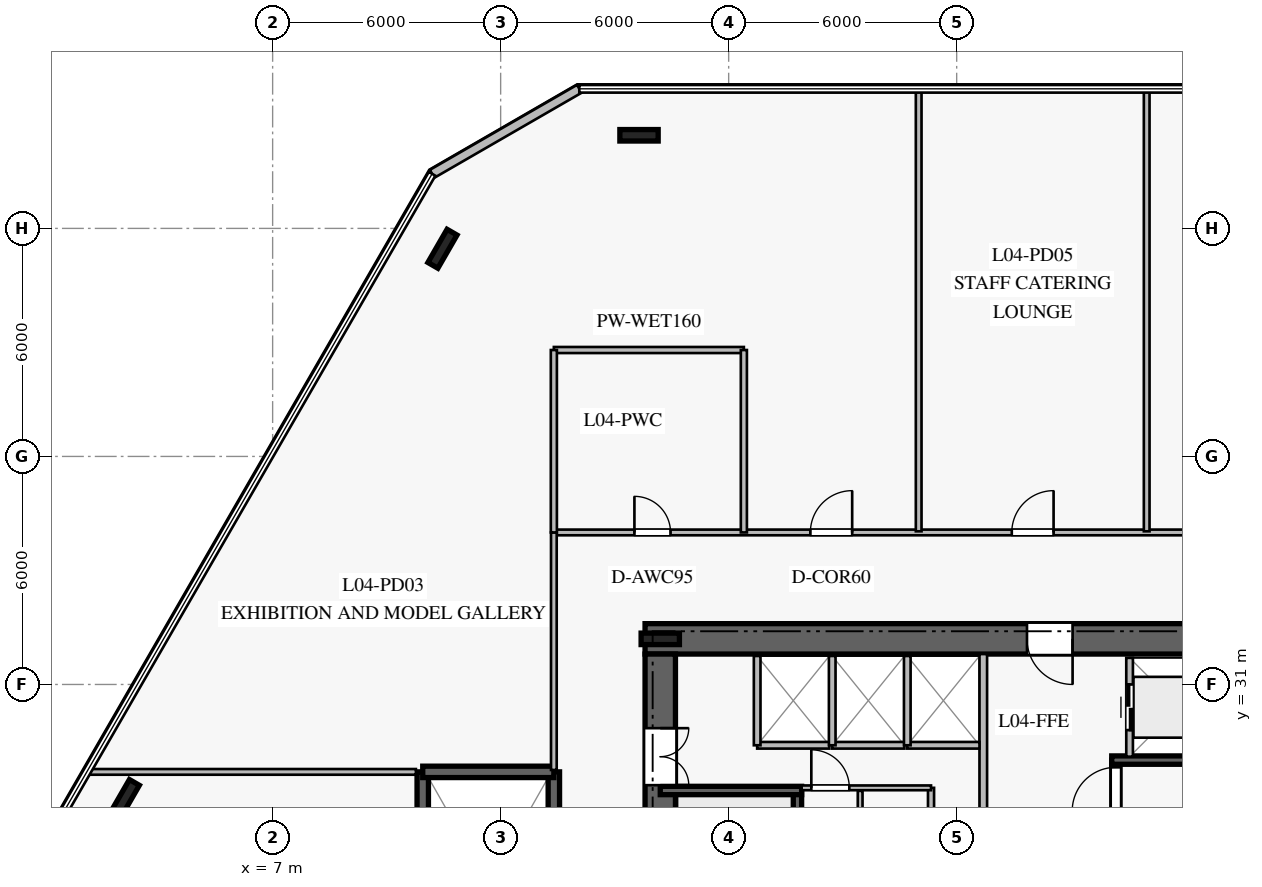
"""IFC4 building model, lengths in metres.
Left out: names, types, materials, properties, quantities, classifications, styles, units other than length and angle.
Written with IfcOpenShell. Run it as: python <this file> out.ifc"""

import sys

from ifc_helpers import new_model, si_unit, direction, frame, frame_2d, origin, origin_2d, place, context, subcontext, project, spatial, rectangle, i_section, extrude, element, fill, save


model = new_model("IFC4")
c1 = context("Model", 3, precision=1e-05, world=origin(), true_north=direction((0.0, 1.0)))
c2 = subcontext(c1, "Body", "Model", "MODEL_VIEW")
j1 = project(units=[si_unit("LENGTHUNIT", "METRE"), si_unit("PLANEANGLEUNIT", "RADIAN")], contexts=[c1])
p1 = place(None, origin())
s1 = spatial("IfcSite", under=j1, at=p1, CompositionType="ELEMENT")
p2 = place(p1, origin())
s2 = spatial("IfcBuilding", under=s1, at=p2, CompositionType="ELEMENT")
p3 = place(p2, frame((0.0, 0.0, 19.0)))
s3 = spatial("IfcBuildingStorey", under=s2, at=p3, CompositionType="ELEMENT", Elevation=19.0)
p4 = place(p3, frame((33.2, 32.2, 0.0), z_axis=(0.0, 0.0, 1.0), x_axis=(-1.0, 0.0, 0.0)))
e1 = element("IfcWall", 1, at=p4, inside=s3, PredefinedType="SHEAR", context=c2, shape_type="SweptSolid", body=[
    extrude(rectangle(XDim=16.4, YDim=0.8, at=frame_2d((8.2, 0.0))), origin(), (0.0, 0.0, 1.0), 4.76),
])
p5 = place(p4, frame((5.15, 0.0, 0.0)))
e2 = element("IfcOpeningElement", 2, at=p5, cuts=e1, PredefinedType="OPENING", context=c2, shape_type="SweptSolid", body=[
    extrude(rectangle(XDim=1.2, YDim=2.25, at=frame_2d((0.6, 1.125))), frame((0.0, 0.41, 0.0), z_axis=(0.0, -1.0, 0.0), x_axis=(1.0, 0.0, 0.0)), (0.0, 0.0, 1.0), 0.82),
])
p6 = place(p3, frame((17.2, 31.8, 0.0), z_axis=(0.0, 0.0, 1.0), x_axis=(0.0, -1.0, 0.0)))
e3 = element("IfcWall", 3, at=p6, inside=s3, PredefinedType="SHEAR", context=c2, shape_type="SweptSolid", body=[
    extrude(rectangle(XDim=13.6, YDim=0.8, at=frame_2d((6.8, 0.0))), origin(), (0.0, 0.0, 1.0), 4.76),
])
p7 = place(p6, frame((1.95, 0.0, 0.0)))
e4 = element("IfcOpeningElement", 4, at=p7, cuts=e3, PredefinedType="OPENING", context=c2, shape_type="SweptSolid", body=[
    extrude(rectangle(XDim=1.5, YDim=2.2, at=frame_2d((0.75, 1.1))), frame((0.0, 0.41, 0.0), z_axis=(0.0, -1.0, 0.0), x_axis=(1.0, 0.0, 0.0)), (0.0, 0.0, 1.0), 0.82),
])
p8 = place(p3, frame((17.2, 32.2, 0.0), z_axis=(0.0, 0.0, 1.0), x_axis=(1.0, 0.0, 0.0)))
e5 = element("IfcColumn", 5, at=p8, inside=s3, PredefinedType="COLUMN", context=c2, shape_type="SweptSolid", body=[
    extrude(i_section(OverallWidth=0.302, OverallDepth=1.008, WebThickness=0.021, FlangeThickness=0.04, at=origin_2d()), origin(), (0.0, 0.0, 1.0), 5.0),
])
p9 = place(p3, frame((20.81, 20.99, 0.0), z_axis=(0.0, 0.0, 1.0), x_axis=(0.0, 1.0, 0.0)))
e6 = element("IfcWall", 6, at=p9, inside=s3, PredefinedType="SOLIDWALL", context=c2, shape_type="SweptSolid", body=[
    extrude(rectangle(XDim=7.22, YDim=0.22, at=frame_2d((3.61, 0.0))), origin(), (0.0, 0.0, 1.0), 4.76),
])
p10 = place(p9, frame((0.18, 0.0, 0.0)))
e7 = element("IfcOpeningElement", 7, at=p10, cuts=e6, PredefinedType="OPENING", context=c2, shape_type="SweptSolid", body=[
    extrude(rectangle(XDim=1.15, YDim=2.2, at=frame_2d((0.575, 1.1))), frame((0.0, 0.12, 0.0), z_axis=(0.0, -1.0, 0.0), x_axis=(1.0, 0.0, 0.0)), (0.0, 0.0, 1.0), 0.24),
])
p11 = place(p3, frame((17.2, 28.21, 0.0), z_axis=(0.0, 0.0, 1.0), x_axis=(1.0, 0.0, 0.0)))
e8 = element("IfcWall", 8, at=p11, inside=s3, PredefinedType="SOLIDWALL", context=c2, shape_type="SweptSolid", body=[
    extrude(rectangle(XDim=3.72, YDim=0.22, at=frame_2d((1.86, 0.0))), origin(), (0.0, 0.0, 1.0), 4.76),
])
p12 = place(p3, frame((29.19, 21.79, 0.0), z_axis=(0.0, 0.0, 1.0), x_axis=(0.0, 1.0, 0.0)))
e9 = element("IfcWall", 9, at=p12, inside=s3, PredefinedType="SOLIDWALL", context=c2, shape_type="SweptSolid", body=[
    extrude(rectangle(XDim=7.22, YDim=0.22, at=frame_2d((3.61, 0.0))), origin(), (0.0, 0.0, 1.0), 4.76),
])
p13 = place(p12, frame((5.88, 0.0, 0.0)))
e10 = element("IfcOpeningElement", 10, at=p13, cuts=e9, PredefinedType="OPENING", context=c2, shape_type="SweptSolid", body=[
    extrude(rectangle(XDim=1.15, YDim=2.2, at=frame_2d((0.575, 1.1))), frame((0.0, 0.12, 0.0), z_axis=(0.0, -1.0, 0.0), x_axis=(1.0, 0.0, 0.0)), (0.0, 0.0, 1.0), 0.24),
])
p14 = place(p3, frame((29.08, 29.01, 0.0), z_axis=(0.0, 0.0, 1.0), x_axis=(1.0, 0.0, 0.0)))
e11 = element("IfcWall", 11, at=p14, inside=s3, PredefinedType="SOLIDWALL", context=c2, shape_type="SweptSolid", body=[
    extrude(rectangle(XDim=3.72, YDim=0.22, at=frame_2d((1.86, 0.0))), origin(), (0.0, 0.0, 1.0), 4.76),
])
p15 = place(p3, frame((14.4, 21.3, 0.0), z_axis=(0.0, 0.0, 1.0), x_axis=(0.0, 1.0, 0.0)))
e12 = element("IfcWall", 12, at=p15, inside=s3, PredefinedType="SOLIDWALL", context=c2, shape_type="SweptSolid", body=[
    extrude(rectangle(XDim=7.4, YDim=0.3, at=frame_2d((3.7, 0.0))), origin(), (0.0, 0.0, 1.0), 4.76),
])
p16 = place(p15, frame((0.22, 0.0, 0.0)))
e13 = element("IfcOpeningElement", 13, at=p16, cuts=e12, PredefinedType="OPENING", context=c2, shape_type="SweptSolid", body=[
    extrude(rectangle(XDim=1.15, YDim=2.2, at=frame_2d((0.575, 1.1))), frame((0.0, 0.16, 0.0), z_axis=(0.0, -1.0, 0.0), x_axis=(1.0, 0.0, 0.0)), (0.0, 0.0, 1.0), 0.32),
])
p17 = place(p3, frame((10.95, 21.3, 0.0), z_axis=(0.0, 0.0, 1.0), x_axis=(0.0, 1.0, 0.0)))
e14 = element("IfcWall", 14, at=p17, inside=s3, PredefinedType="SOLIDWALL", context=c2, shape_type="SweptSolid", body=[
    extrude(rectangle(XDim=7.4, YDim=0.3, at=frame_2d((3.7, 0.0))), origin(), (0.0, 0.0, 1.0), 4.76),
])
p18 = place(p3, frame((10.95, 28.7, 0.0), z_axis=(0.0, 0.0, 1.0), x_axis=(1.0, 0.0, 0.0)))
e15 = element("IfcWall", 15, at=p18, inside=s3, PredefinedType="SOLIDWALL", context=c2, shape_type="SweptSolid", body=[
    extrude(rectangle(XDim=3.45, YDim=0.3, at=frame_2d((1.725, 0.0))), origin(), (0.0, 0.0, 1.0), 4.76),
])
for number, where, z_axis, x_axis in (
    (16, (16.641, 45.45, 0.0), (0.0, 0.0, 1.0), (1.0, 0.0, 0.0)),
    (17, (11.469, 42.464, 0.0), (0.0, 0.0, 1.0), (0.5, 0.866, 0.0)),
    (18, (3.11, 27.986, 0.0), (0.0, 0.0, 1.0), (0.5, 0.866, 0.0)),
):
    element("IfcColumn", number, at=place(p3, frame(where, z_axis=z_axis, x_axis=x_axis)), inside=s3, PredefinedType="COLUMN", context=c2, shape_type="SweptSolid", body=[
        extrude(i_section(OverallWidth=0.302, OverallDepth=1.008, WebThickness=0.021, FlangeThickness=0.04, at=origin_2d()), origin(), (0.0, 0.0, 1.0), 5.0),
    ])
p19 = place(p3, frame((15.07, 46.673, 0.0), z_axis=(0.0, 0.0, 1.0), x_axis=(-0.865987450899, -0.500065730564, 0.0)))
e19 = element("IfcWall", 19, at=p19, inside=s3, PredefinedType="STANDARD", context=c2, shape_type="SweptSolid", body=[
    extrude(rectangle(XDim=4.474, YDim=0.24, at=frame_2d((2.237, 0.0))), origin(), (0.0, 0.0, 1.0), 4.76),
])
p20 = place(p3, frame((25.7, 26.65, 0.0), z_axis=(0.0, 0.0, 1.0), x_axis=(0.0, 1.0, 0.0)))
e20 = element("IfcWall", 20, at=p20, inside=s3, PredefinedType="PARTITIONING", context=c2, shape_type="SweptSolid", body=[
    extrude(rectangle(XDim=5.15, YDim=0.2, at=frame_2d((2.575, 0.0))), origin(), (0.0, 0.0, 1.0), 4.76),
])
p21 = place(p3, frame((24.325, 23.35, 0.0), z_axis=(0.0, 0.0, 1.0), x_axis=(0.0, 1.0, 0.0)))
e21 = element("IfcWall", 21, at=p21, inside=s3, PredefinedType="PLUMBINGWALL", context=c2, shape_type="SweptSolid", body=[
    extrude(rectangle(XDim=4.93, YDim=0.16, at=frame_2d((2.465, 0.0))), origin(), (0.0, 0.0, 1.0), 4.76),
])
p22 = place(p21, frame((0.65, 0.0, 0.0)))
e22 = element("IfcOpeningElement", 22, at=p22, cuts=e21, PredefinedType="OPENING", context=c2, shape_type="SweptSolid", body=[
    extrude(rectangle(XDim=0.95, YDim=2.1, at=frame_2d((0.475, 1.05))), frame((0.0, 0.09, 0.0), z_axis=(0.0, -1.0, 0.0), x_axis=(1.0, 0.0, 0.0)), (0.0, 0.0, 1.0), 0.18),
])
p23 = place(p21, frame((3.11, 0.0, 0.0)))
e23 = element("IfcOpeningElement", 23, at=p23, cuts=e21, PredefinedType="OPENING", context=c2, shape_type="SweptSolid", body=[
    extrude(rectangle(XDim=0.9, YDim=2.1, at=frame_2d((0.45, 1.05))), frame((0.0, 0.09, 0.0), z_axis=(0.0, -1.0, 0.0), x_axis=(1.0, 0.0, 0.0)), (0.0, 0.0, 1.0), 0.18),
])
p24 = place(p3, frame((20.92, 28.28, 0.0), z_axis=(0.0, 0.0, 1.0), x_axis=(1.0, 0.0, 0.0)))
e24 = element("IfcWall", 24, at=p24, inside=s3, PredefinedType="PARTITIONING", context=c2, shape_type="SweptSolid", body=[
    extrude(rectangle(XDim=3.405, YDim=0.125, at=frame_2d((1.703, 0.0))), origin(), (0.0, 0.0, 1.0), 4.76),
])
p25 = place(p24, frame((0.255, 0.0, 0.0)))
e25 = element("IfcOpeningElement", 25, at=p25, cuts=e24, PredefinedType="OPENING", context=c2, shape_type="SweptSolid", body=[
    extrude(rectangle(XDim=1.0, YDim=2.15, at=frame_2d((0.5, 1.075))), frame((0.0, 0.073, 0.0), z_axis=(0.0, -1.0, 0.0), x_axis=(1.0, 0.0, 0.0)), (0.0, 0.0, 1.0), 0.145),
])
p26 = place(p3, frame((22.46, 25.62, 0.0), z_axis=(0.0, 0.0, 1.0), x_axis=(0.0, 1.0, 0.0)))
e26 = element("IfcWall", 26, at=p26, inside=s3, PredefinedType="PARTITIONING", context=c2, shape_type="SweptSolid", body=[
    extrude(rectangle(XDim=2.58, YDim=0.125, at=frame_2d((1.29, 0.0))), origin(), (0.0, 0.0, 1.0), 4.76),
])
p27 = place(p3, frame((19.75, 29.4, 0.0), z_axis=(0.0, 0.0, 1.0), x_axis=(1.0, 0.0, 0.0)))
e27 = element("IfcWall", 27, at=p27, inside=s3, PredefinedType="PARTITIONING", context=c2, shape_type="SweptSolid", body=[
    extrude(rectangle(XDim=1.9, YDim=0.175, at=frame_2d((0.95, 0.0))), origin(), (0.0, 0.0, 1.0), 4.76),
])
p28 = place(p3, frame((19.75, 29.4, 0.0), z_axis=(0.0, 0.0, 1.0), x_axis=(0.0, 1.0, 0.0)))
e28 = element("IfcWall", 28, at=p28, inside=s3, PredefinedType="PARTITIONING", context=c2, shape_type="SweptSolid", body=[
    extrude(rectangle(XDim=2.35, YDim=0.175, at=frame_2d((1.175, 0.0))), origin(), (0.0, 0.0, 1.0), 4.76),
])
p29 = place(p3, frame((21.725, 29.4, 0.0), z_axis=(0.0, 0.0, 1.0), x_axis=(1.0, 0.0, 0.0)))
e29 = element("IfcWall", 29, at=p29, inside=s3, PredefinedType="PARTITIONING", context=c2, shape_type="SweptSolid", body=[
    extrude(rectangle(XDim=1.9, YDim=0.175, at=frame_2d((0.95, 0.0))), origin(), (0.0, 0.0, 1.0), 4.76),
])
p30 = place(p3, frame((21.725, 29.4, 0.0), z_axis=(0.0, 0.0, 1.0), x_axis=(0.0, 1.0, 0.0)))
e30 = element("IfcWall", 30, at=p30, inside=s3, PredefinedType="PARTITIONING", context=c2, shape_type="SweptSolid", body=[
    extrude(rectangle(XDim=2.35, YDim=0.175, at=frame_2d((1.175, 0.0))), origin(), (0.0, 0.0, 1.0), 4.76),
])
p31 = place(p3, frame((23.7, 29.4, 0.0), z_axis=(0.0, 0.0, 1.0), x_axis=(1.0, 0.0, 0.0)))
e31 = element("IfcWall", 31, at=p31, inside=s3, PredefinedType="PARTITIONING", context=c2, shape_type="SweptSolid", body=[
    extrude(rectangle(XDim=1.9, YDim=0.175, at=frame_2d((0.95, 0.0))), origin(), (0.0, 0.0, 1.0), 4.76),
])
p32 = place(p3, frame((23.7, 29.4, 0.0), z_axis=(0.0, 0.0, 1.0), x_axis=(0.0, 1.0, 0.0)))
e32 = element("IfcWall", 32, at=p32, inside=s3, PredefinedType="PARTITIONING", context=c2, shape_type="SweptSolid", body=[
    extrude(rectangle(XDim=2.35, YDim=0.175, at=frame_2d((1.175, 0.0))), origin(), (0.0, 0.0, 1.0), 4.76),
])
p33 = place(p3, frame((29.55, 29.1, 0.0), z_axis=(0.0, 0.0, 1.0), x_axis=(0.0, 1.0, 0.0)))
e33 = element("IfcWall", 33, at=p33, inside=s3, PredefinedType="PARTITIONING", context=c2, shape_type="SweptSolid", body=[
    extrude(rectangle(XDim=2.6, YDim=0.175, at=frame_2d((1.3, 0.0))), origin(), (0.0, 0.0, 1.0), 4.76),
])
p34 = place(p33, frame((0.7, 0.0, 0.0)))
e34 = element("IfcOpeningElement", 34, at=p34, cuts=e33, PredefinedType="OPENING", context=c2, shape_type="SweptSolid", body=[
    extrude(rectangle(XDim=1.2, YDim=2.2, at=frame_2d((0.6, 1.1))), frame((0.0, 0.098, 0.0), z_axis=(0.0, -1.0, 0.0), x_axis=(1.0, 0.0, 0.0)), (0.0, 0.0, 1.0), 0.195),
])
p35 = place(p3, frame((14.4, 35.0, 0.0), z_axis=(0.0, 0.0, 1.0), x_axis=(1.0, 0.0, 0.0)))
e35 = element("IfcWall", 35, at=p35, inside=s3, PredefinedType="PARTITIONING", context=c2, shape_type="SweptSolid", body=[
    extrude(rectangle(XDim=21.2, YDim=0.15, at=frame_2d((10.6, 0.0))), origin(), (0.0, 0.0, 1.0), 2.76),
])
p36 = place(p35, frame((2.12, 0.0, 0.0)))
e36 = element("IfcOpeningElement", 36, at=p36, cuts=e35, PredefinedType="OPENING", context=c2, shape_type="SweptSolid", body=[
    extrude(rectangle(XDim=0.95, YDim=2.1, at=frame_2d((0.475, 1.05))), frame((0.0, 0.085, 0.0), z_axis=(0.0, -1.0, 0.0), x_axis=(1.0, 0.0, 0.0)), (0.0, 0.0, 1.0), 0.17),
])
p37 = place(p35, frame((6.75, 0.0, 0.0)))
e37 = element("IfcOpeningElement", 37, at=p37, cuts=e35, PredefinedType="OPENING", context=c2, shape_type="SweptSolid", body=[
    extrude(rectangle(XDim=1.1, YDim=2.2, at=frame_2d((0.55, 1.1))), frame((0.0, 0.085, 0.0), z_axis=(0.0, -1.0, 0.0), x_axis=(1.0, 0.0, 0.0)), (0.0, 0.0, 1.0), 0.17),
])
p38 = place(p35, frame((17.666, 0.0, 0.0)))
e38 = element("IfcOpeningElement", 38, at=p38, cuts=e35, PredefinedType="OPENING", context=c2, shape_type="SweptSolid", body=[
    extrude(rectangle(XDim=1.1, YDim=2.2, at=frame_2d((0.55, 1.1))), frame((0.0, 0.085, 0.0), z_axis=(0.0, -1.0, 0.0), x_axis=(1.0, 0.0, 0.0)), (0.0, 0.0, 1.0), 0.17),
])
p39 = place(p35, frame((12.05, 0.0, 0.0)))
e39 = element("IfcOpeningElement", 39, at=p39, cuts=e35, PredefinedType="OPENING", context=c2, shape_type="SweptSolid", body=[
    extrude(rectangle(XDim=1.1, YDim=2.2, at=frame_2d((0.55, 1.1))), frame((0.0, 0.085, 0.0), z_axis=(0.0, -1.0, 0.0), x_axis=(1.0, 0.0, 0.0)), (0.0, 0.0, 1.0), 0.17),
])
p40 = place(p3, frame((14.4, 28.75, 0.0), z_axis=(0.0, 0.0, 1.0), x_axis=(0.0, 1.0, 0.0)))
e40 = element("IfcWall", 40, at=p40, inside=s3, PredefinedType="PARTITIONING", context=c2, shape_type="SweptSolid", body=[
    extrude(rectangle(XDim=6.25, YDim=0.15, at=frame_2d((3.125, 0.0))), origin(), (0.0, 0.0, 1.0), 2.76),
])
p41 = place(p3, frame((14.4, 39.8, 0.0), z_axis=(0.0, 0.0, 1.0), x_axis=(1.0, 0.0, 0.0)))
e41 = element("IfcWall", 41, at=p41, inside=s3, PredefinedType="PLUMBINGWALL", context=c2, shape_type="SweptSolid", body=[
    extrude(rectangle(XDim=5.0, YDim=0.16, at=frame_2d((2.5, 0.0))), origin(), (0.0, 0.0, 1.0), 2.76),
])
p42 = place(p3, frame((19.4, 35.0, 0.0), z_axis=(0.0, 0.0, 1.0), x_axis=(0.0, 1.0, 0.0)))
e42 = element("IfcWall", 42, at=p42, inside=s3, PredefinedType="PLUMBINGWALL", context=c2, shape_type="SweptSolid", body=[
    extrude(rectangle(XDim=4.8, YDim=0.16, at=frame_2d((2.4, 0.0))), origin(), (0.0, 0.0, 1.0), 4.76),
])
p43 = place(p3, frame((14.4, 35.0, 0.0), z_axis=(0.0, 0.0, 1.0), x_axis=(0.0, 1.0, 0.0)))
e43 = element("IfcWall", 43, at=p43, inside=s3, PredefinedType="PLUMBINGWALL", context=c2, shape_type="SweptSolid", body=[
    extrude(rectangle(XDim=4.8, YDim=0.16, at=frame_2d((2.4, 0.0))), origin(), (0.0, 0.0, 1.0), 2.76),
])
p44 = place(p3, frame((2.08, 28.7, 0.0), z_axis=(0.0, 0.0, 1.0), x_axis=(1.0, 0.0, 0.0)))
e44 = element("IfcWall", 44, at=p44, inside=s3, PredefinedType="PARTITIONING", context=c2, shape_type="SweptSolid", body=[
    extrude(rectangle(XDim=8.69, YDim=0.15, at=frame_2d((4.345, 0.0))), origin(), (0.0, 0.0, 1.0), 2.76),
])
for number, where, z_axis, x_axis in (
    (45, (24.0, 35.03, 0.0), (0.0, 0.0, 1.0), (0.0, 1.0, 0.0)),
    (46, (30.0, 35.03, 0.0), (0.0, 0.0, 1.0), (0.0, 1.0, 0.0)),
):
    element("IfcWall", number, at=place(p3, frame(where, z_axis=z_axis, x_axis=x_axis)), inside=s3, PredefinedType="PARTITIONING", context=c2, shape_type="SweptSolid", body=[
        extrude(rectangle(XDim=11.67, YDim=0.15, at=frame_2d((5.835, 0.0))), origin(), (0.0, 0.0, 1.0), 2.76),
    ])
p45 = place(p13, origin())
e47 = element("IfcDoor", 47, at=p45, inside=s3, OperationType="SINGLE_SWING_LEFT", PredefinedType="DOOR", context=c2, shape_type="SweptSolid", body=[
    extrude(rectangle(XDim=1.15, YDim=2.2, at=frame_2d((0.575, 1.1))), frame((0.0, 0.025, 0.0), z_axis=(0.0, -1.0, 0.0), x_axis=(1.0, 0.0, 0.0)), (0.0, 0.0, 1.0), 0.05),
])
fill(e10, e47)
p46 = place(p5, origin())
e48 = element("IfcDoor", 48, at=p46, inside=s3, OperationType="SINGLE_SWING_LEFT", PredefinedType="DOOR", context=c2, shape_type="SweptSolid", body=[
    extrude(rectangle(XDim=1.2, YDim=2.25, at=frame_2d((0.6, 1.125))), frame((0.0, 0.025, 0.0), z_axis=(0.0, -1.0, 0.0), x_axis=(1.0, 0.0, 0.0)), (0.0, 0.0, 1.0), 0.05),
])
fill(e2, e48)
p47 = place(p7, origin())
e49 = element("IfcDoor", 49, at=p47, inside=s3, OperationType="DOUBLE_DOOR_SINGLE_SWING", PredefinedType="DOOR", context=c2, shape_type="SweptSolid", body=[
    extrude(rectangle(XDim=1.5, YDim=2.2, at=frame_2d((0.75, 1.1))), frame((0.0, 0.025, 0.0), z_axis=(0.0, -1.0, 0.0), x_axis=(1.0, 0.0, 0.0)), (0.0, 0.0, 1.0), 0.05),
])
fill(e4, e49)
p48 = place(p25, origin())
e50 = element("IfcDoor", 50, at=p48, inside=s3, OperationType="SINGLE_SWING_LEFT", PredefinedType="DOOR", context=c2, shape_type="SweptSolid", body=[
    extrude(rectangle(XDim=1.0, YDim=2.15, at=frame_2d((0.5, 1.075))), frame((0.0, 0.025, 0.0), z_axis=(0.0, -1.0, 0.0), x_axis=(1.0, 0.0, 0.0)), (0.0, 0.0, 1.0), 0.05),
])
fill(e25, e50)
p49 = place(p34, origin())
e51 = element("IfcDoor", 51, at=p49, inside=s3, OperationType="DOUBLE_DOOR_SLIDING", PredefinedType="DOOR", context=c2, shape_type="SweptSolid", body=[
    extrude(rectangle(XDim=1.2, YDim=2.2, at=frame_2d((0.6, 1.1))), frame((0.0, 0.025, 0.0), z_axis=(0.0, -1.0, 0.0), x_axis=(1.0, 0.0, 0.0)), (0.0, 0.0, 1.0), 0.05),
])
fill(e34, e51)
p50 = place(p36, origin())
e52 = element("IfcDoor", 52, at=p50, inside=s3, OperationType="SINGLE_SWING_LEFT", PredefinedType="DOOR", context=c2, shape_type="SweptSolid", body=[
    extrude(rectangle(XDim=0.95, YDim=2.1, at=frame_2d((0.475, 1.05))), frame((0.0, 0.025, 0.0), z_axis=(0.0, -1.0, 0.0), x_axis=(1.0, 0.0, 0.0)), (0.0, 0.0, 1.0), 0.05),
])
fill(e36, e52)
p51 = place(p37, origin())
e53 = element("IfcDoor", 53, at=p51, inside=s3, OperationType="SINGLE_SWING_RIGHT", PredefinedType="DOOR", context=c2, shape_type="SweptSolid", body=[
    extrude(rectangle(XDim=1.1, YDim=2.2, at=frame_2d((0.55, 1.1))), frame((0.0, 0.025, 0.0), z_axis=(0.0, -1.0, 0.0), x_axis=(1.0, 0.0, 0.0)), (0.0, 0.0, 1.0), 0.05),
])
fill(e37, e53)
p52 = place(p39, origin())
e54 = element("IfcDoor", 54, at=p52, inside=s3, OperationType="SINGLE_SWING_RIGHT", PredefinedType="DOOR", context=c2, shape_type="SweptSolid", body=[
    extrude(rectangle(XDim=1.1, YDim=2.2, at=frame_2d((0.55, 1.1))), frame((0.0, 0.025, 0.0), z_axis=(0.0, -1.0, 0.0), x_axis=(1.0, 0.0, 0.0)), (0.0, 0.0, 1.0), 0.05),
])
fill(e39, e54)
save(model, sys.argv[1])
